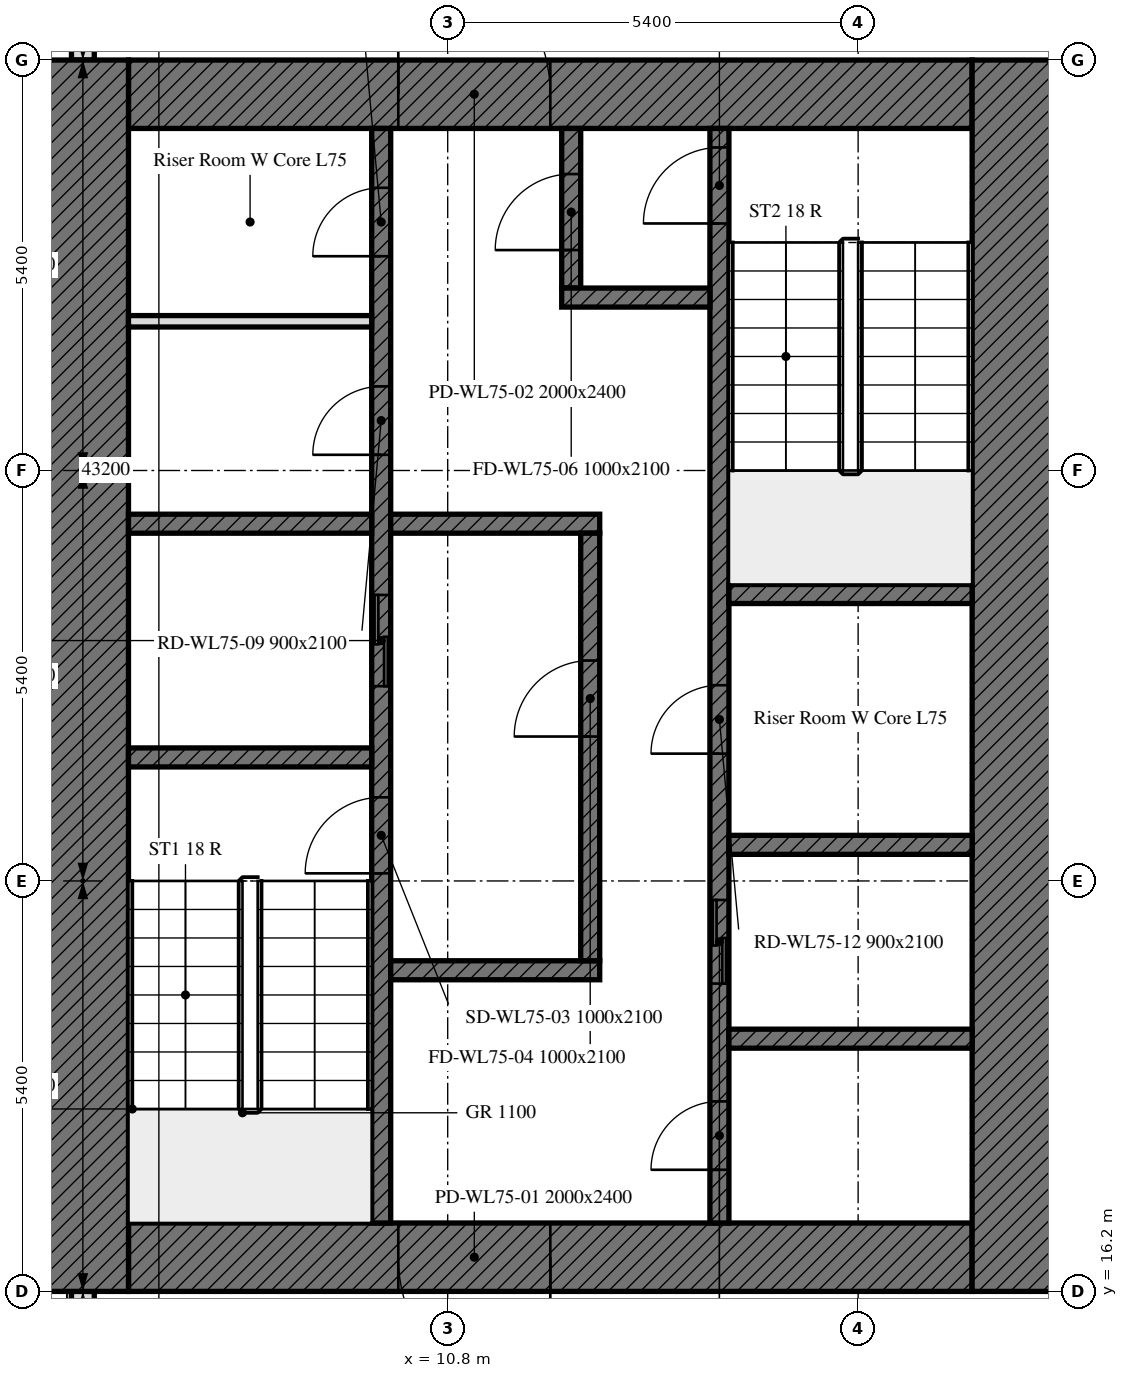
"""IFC4 building model, lengths in metres.
Left out: names, types, materials, properties, quantities, classifications, styles, units other than length and angle.
Written with IfcOpenShell. Run it as: python <this file> out.ifc"""

import sys

from ifc_helpers import new_model, si_unit, direction, frame, frame_2d, origin, place, context, subcontext, project, spatial, rectangle, extrude, element, fill, save


model = new_model("IFC4")
c1 = context("Model", 3, precision=1e-05, world=origin(), true_north=direction((0.0, 1.0)))
c2 = subcontext(c1, "Body", "Model", "MODEL_VIEW")
j1 = project(units=[si_unit("LENGTHUNIT", "METRE"), si_unit("PLANEANGLEUNIT", "RADIAN")], contexts=[c1])
p1 = place(None, origin())
s1 = spatial("IfcSite", under=j1, at=p1, CompositionType="ELEMENT")
p2 = place(p1, origin())
s2 = spatial("IfcBuilding", under=s1, at=p2, CompositionType="ELEMENT")
p3 = place(p2, frame((0.0, 0.0, 301.6)))
s3 = spatial("IfcBuildingStorey", under=s2, at=p3, CompositionType="ELEMENT", Elevation=301.6)
p4 = place(p3, frame((6.0, 43.014, 0.0), z_axis=(0.0, 0.0, 1.0), x_axis=(0.0, -1.0, 0.0)))
e1 = element("IfcWall", 1, at=p4, inside=s3, PredefinedType="SOLIDWALL", context=c2, shape_type="SweptSolid", body=[
    extrude(rectangle(XDim=10.614, YDim=0.3, at=frame_2d((5.307, 0.0))), origin(), (0.0, 0.0, 1.0), 3.0),
])
p5 = place(p4, frame((1.164, 0.0, 0.9)))
e2 = element("IfcOpeningElement", 2, at=p5, cuts=e1, PredefinedType="OPENING", context=c2, shape_type="SweptSolid", body=[
    extrude(rectangle(XDim=1.1, YDim=1.7, at=frame_2d((0.55, 0.85))), frame((0.0, 0.16, 0.0), z_axis=(0.0, -1.0, 0.0), x_axis=(1.0, 0.0, 0.0)), (0.0, 0.0, 1.0), 0.32),
])
p6 = place(p4, frame((2.764, 0.0, 0.9)))
e3 = element("IfcOpeningElement", 3, at=p6, cuts=e1, PredefinedType="OPENING", context=c2, shape_type="SweptSolid", body=[
    extrude(rectangle(XDim=1.1, YDim=1.7, at=frame_2d((0.55, 0.85))), frame((0.0, 0.16, 0.0), z_axis=(0.0, -1.0, 0.0), x_axis=(1.0, 0.0, 0.0)), (0.0, 0.0, 1.0), 0.32),
])
p7 = place(p4, frame((6.564, 0.0, 0.9)))
e4 = element("IfcOpeningElement", 4, at=p7, cuts=e1, PredefinedType="OPENING", context=c2, shape_type="SweptSolid", body=[
    extrude(rectangle(XDim=1.1, YDim=1.7, at=frame_2d((0.55, 0.85))), frame((0.0, 0.16, 0.0), z_axis=(0.0, -1.0, 0.0), x_axis=(1.0, 0.0, 0.0)), (0.0, 0.0, 1.0), 0.32),
])
p8 = place(p4, frame((7.989, 0.0, 0.9)))
e5 = element("IfcOpeningElement", 5, at=p8, cuts=e1, PredefinedType="OPENING", context=c2, shape_type="SweptSolid", body=[
    extrude(rectangle(XDim=0.65, YDim=1.7, at=frame_2d((0.325, 0.85))), frame((0.0, 0.16, 0.0), z_axis=(0.0, -1.0, 0.0), x_axis=(1.0, 0.0, 0.0)), (0.0, 0.0, 1.0), 0.32),
])
p9 = place(p3, frame((6.0, 16.2, 0.0), z_axis=(0.0, 0.0, 1.0), x_axis=(0.0, -1.0, 0.0)))
e6 = element("IfcWall", 6, at=p9, inside=s3, PredefinedType="SOLIDWALL", context=c2, shape_type="SweptSolid", body=[
    extrude(rectangle(XDim=5.214, YDim=0.3, at=frame_2d((2.607, 0.0))), origin(), (0.0, 0.0, 1.0), 3.0),
])
p10 = place(p9, frame((1.975, 0.0, 0.9)))
e7 = element("IfcOpeningElement", 7, at=p10, cuts=e6, PredefinedType="OPENING", context=c2, shape_type="SweptSolid", body=[
    extrude(rectangle(XDim=0.65, YDim=1.7, at=frame_2d((0.325, 0.85))), frame((0.0, 0.16, 0.0), z_axis=(0.0, -1.0, 0.0), x_axis=(1.0, 0.0, 0.0)), (0.0, 0.0, 1.0), 0.32),
])
p11 = place(p9, frame((2.8, 0.0, 0.9)))
e8 = element("IfcOpeningElement", 8, at=p11, cuts=e6, PredefinedType="OPENING", context=c2, shape_type="SweptSolid", body=[
    extrude(rectangle(XDim=1.1, YDim=1.7, at=frame_2d((0.55, 0.85))), frame((0.0, 0.16, 0.0), z_axis=(0.0, -1.0, 0.0), x_axis=(1.0, 0.0, 0.0)), (0.0, 0.0, 1.0), 0.32),
])
p12 = place(p3, frame((17.7, 16.65, 0.0), z_axis=(0.0, 0.0, 1.0), x_axis=(-1.0, 0.0, 0.0)))
e9 = element("IfcWall", 9, at=p12, inside=s3, PredefinedType="SOLIDWALL", context=c2, shape_type="SweptSolid", body=[
    extrude(rectangle(XDim=11.1, YDim=0.9, at=frame_2d((5.55, 0.0))), origin(), (0.0, 0.0, 1.0), 3.0),
])
p13 = place(p12, frame((5.55, 0.0, 0.0)))
e10 = element("IfcOpeningElement", 10, at=p13, cuts=e9, PredefinedType="OPENING", context=c2, shape_type="SweptSolid", body=[
    extrude(rectangle(XDim=2.0, YDim=2.4, at=frame_2d((1.0, 1.2))), frame((0.0, 0.45, 0.0), z_axis=(0.0, -1.0, 0.0), x_axis=(1.0, 0.0, 0.0)), (0.0, 0.0, 1.0), 0.9),
])
p14 = place(p3, frame((6.6, 31.95, 0.0), z_axis=(0.0, 0.0, 1.0), x_axis=(1.0, 0.0, 0.0)))
e11 = element("IfcWall", 11, at=p14, inside=s3, PredefinedType="SOLIDWALL", context=c2, shape_type="SweptSolid", body=[
    extrude(rectangle(XDim=11.1, YDim=0.9, at=frame_2d((5.55, 0.0))), origin(), (0.0, 0.0, 1.0), 3.0),
])
p15 = place(p14, frame((3.55, 0.0, 0.0)))
e12 = element("IfcOpeningElement", 12, at=p15, cuts=e11, PredefinedType="OPENING", context=c2, shape_type="SweptSolid", body=[
    extrude(rectangle(XDim=2.0, YDim=2.4, at=frame_2d((1.0, 1.2))), frame((0.0, 0.45, 0.0), z_axis=(0.0, -1.0, 0.0), x_axis=(1.0, 0.0, 0.0)), (0.0, 0.0, 1.0), 0.9),
])
for number, where, z_axis, x_axis in (
    (13, (6.0, 16.2, 0.0), (0.0, 0.0, 1.0), (0.0, 1.0, 0.0)),
    (14, (18.3, 32.4, 0.0), (0.0, 0.0, 1.0), (0.0, -1.0, 0.0)),
):
    element("IfcWall", number, at=place(p3, frame(where, z_axis=z_axis, x_axis=x_axis)), inside=s3, PredefinedType="SOLIDWALL", context=c2, shape_type="SweptSolid", body=[
        extrude(rectangle(XDim=16.2, YDim=1.2, at=frame_2d((8.1, 0.0))), origin(), (0.0, 0.0, 1.0), 3.0),
    ])
p16 = place(p3, frame((9.925, 17.1, 0.0), z_axis=(0.0, 0.0, 1.0), x_axis=(0.0, 1.0, 0.0)))
e15 = element("IfcWall", 15, at=p16, inside=s3, PredefinedType="SOLIDWALL", context=c2, shape_type="SweptSolid", body=[
    extrude(rectangle(XDim=14.4, YDim=0.25, at=frame_2d((7.2, 0.0))), origin(), (0.0, 0.0, 1.0), 3.0),
])
p17 = place(p16, frame((4.6, 0.0, 0.0)))
e16 = element("IfcOpeningElement", 16, at=p17, cuts=e15, PredefinedType="OPENING", context=c2, shape_type="SweptSolid", body=[
    extrude(rectangle(XDim=1.0, YDim=2.1, at=frame_2d((0.5, 1.05))), frame((0.0, 0.125, 0.0), z_axis=(0.0, -1.0, 0.0), x_axis=(1.0, 0.0, 0.0)), (0.0, 0.0, 1.0), 0.25),
])
p18 = place(p16, frame((7.062, 0.0, 0.0)))
e17 = element("IfcOpeningElement", 17, at=p18, cuts=e15, PredefinedType="OPENING", context=c2, shape_type="SweptSolid", body=[
    extrude(rectangle(XDim=1.2, YDim=2.1, at=frame_2d((0.6, 1.05))), frame((0.0, 0.125, 0.0), z_axis=(0.0, -1.0, 0.0), x_axis=(1.0, 0.0, 0.0)), (0.0, 0.0, 1.0), 0.25),
])
p19 = place(p16, frame((10.106, 0.0, 0.0)))
e18 = element("IfcOpeningElement", 18, at=p19, cuts=e15, PredefinedType="OPENING", context=c2, shape_type="SweptSolid", body=[
    extrude(rectangle(XDim=0.9, YDim=2.1, at=frame_2d((0.45, 1.05))), frame((0.0, 0.125, 0.0), z_axis=(0.0, -1.0, 0.0), x_axis=(1.0, 0.0, 0.0)), (0.0, 0.0, 1.0), 0.25),
])
p20 = place(p16, frame((12.719, 0.0, 0.0)))
e19 = element("IfcOpeningElement", 19, at=p20, cuts=e15, PredefinedType="OPENING", context=c2, shape_type="SweptSolid", body=[
    extrude(rectangle(XDim=0.9, YDim=2.1, at=frame_2d((0.45, 1.05))), frame((0.0, 0.125, 0.0), z_axis=(0.0, -1.0, 0.0), x_axis=(1.0, 0.0, 0.0)), (0.0, 0.0, 1.0), 0.25),
])
p21 = place(p3, frame((14.375, 17.1, 0.0), z_axis=(0.0, 0.0, 1.0), x_axis=(0.0, 1.0, 0.0)))
e20 = element("IfcWall", 20, at=p21, inside=s3, PredefinedType="SOLIDWALL", context=c2, shape_type="SweptSolid", body=[
    extrude(rectangle(XDim=14.4, YDim=0.25, at=frame_2d((7.2, 0.0))), origin(), (0.0, 0.0, 1.0), 3.0),
])
p22 = place(p21, frame((13.15, 0.0, 0.0)))
e21 = element("IfcOpeningElement", 21, at=p22, cuts=e20, PredefinedType="OPENING", context=c2, shape_type="SweptSolid", body=[
    extrude(rectangle(XDim=1.0, YDim=2.1, at=frame_2d((0.5, 1.05))), frame((0.0, 0.125, 0.0), z_axis=(0.0, -1.0, 0.0), x_axis=(1.0, 0.0, 0.0)), (0.0, 0.0, 1.0), 0.25),
])
p23 = place(p21, frame((3.15, 0.0, 0.0)))
e22 = element("IfcOpeningElement", 22, at=p23, cuts=e20, PredefinedType="OPENING", context=c2, shape_type="SweptSolid", body=[
    extrude(rectangle(XDim=1.1, YDim=2.1, at=frame_2d((0.55, 1.05))), frame((0.0, 0.125, 0.0), z_axis=(0.0, -1.0, 0.0), x_axis=(1.0, 0.0, 0.0)), (0.0, 0.0, 1.0), 0.25),
])
p24 = place(p21, frame((0.7, 0.0, 0.0)))
e23 = element("IfcOpeningElement", 23, at=p24, cuts=e20, PredefinedType="OPENING", context=c2, shape_type="SweptSolid", body=[
    extrude(rectangle(XDim=0.9, YDim=2.1, at=frame_2d((0.45, 1.05))), frame((0.0, 0.125, 0.0), z_axis=(0.0, -1.0, 0.0), x_axis=(1.0, 0.0, 0.0)), (0.0, 0.0, 1.0), 0.25),
])
p25 = place(p21, frame((6.175, 0.0, 0.0)))
e24 = element("IfcOpeningElement", 24, at=p25, cuts=e20, PredefinedType="OPENING", context=c2, shape_type="SweptSolid", body=[
    extrude(rectangle(XDim=0.9, YDim=2.1, at=frame_2d((0.45, 1.05))), frame((0.0, 0.125, 0.0), z_axis=(0.0, -1.0, 0.0), x_axis=(1.0, 0.0, 0.0)), (0.0, 0.0, 1.0), 0.25),
])
for number, where, z_axis, x_axis in (
    (25, (6.6, 23.225, 0.0), (0.0, 0.0, 1.0), (1.0, 0.0, 0.0)),
    (26, (14.5, 25.375, 0.0), (0.0, 0.0, 1.0), (1.0, 0.0, 0.0)),
    (27, (14.5, 22.075, 0.0), (0.0, 0.0, 1.0), (1.0, 0.0, 0.0)),
    (28, (6.6, 26.3, 0.0), (0.0, 0.0, 1.0), (1.0, 0.0, 0.0)),
):
    element("IfcWall", number, at=place(p3, frame(where, z_axis=z_axis, x_axis=x_axis)), inside=s3, PredefinedType="SOLIDWALL", context=c2, shape_type="SweptSolid", body=[
        extrude(rectangle(XDim=3.2, YDim=0.25, at=frame_2d((1.6, 0.0))), origin(), (0.0, 0.0, 1.0), 3.0),
    ])
for number, where, z_axis, x_axis in (
    (29, (10.05, 26.3, 0.0), (0.0, 0.0, 1.0), (1.0, 0.0, 0.0)),
    (30, (10.05, 20.425, 0.0), (0.0, 0.0, 1.0), (1.0, 0.0, 0.0)),
):
    element("IfcWall", number, at=place(p3, frame(where, z_axis=z_axis, x_axis=x_axis)), inside=s3, PredefinedType="SOLIDWALL", context=c2, shape_type="SweptSolid", body=[
        extrude(rectangle(XDim=2.75, YDim=0.25, at=frame_2d((1.375, 0.0))), origin(), (0.0, 0.0, 1.0), 3.0),
    ])
p26 = place(p3, frame((12.425, 29.4, 0.0), z_axis=(0.0, 0.0, 1.0), x_axis=(0.0, 1.0, 0.0)))
e31 = element("IfcWall", 31, at=p26, inside=s3, PredefinedType="SOLIDWALL", context=c2, shape_type="SweptSolid", body=[
    extrude(rectangle(XDim=2.1, YDim=0.25, at=frame_2d((1.05, 0.0))), origin(), (0.0, 0.0, 1.0), 3.0),
])
p27 = place(p26, frame((0.5, 0.0, 0.0)))
e32 = element("IfcOpeningElement", 32, at=p27, cuts=e31, PredefinedType="OPENING", context=c2, shape_type="SweptSolid", body=[
    extrude(rectangle(XDim=1.0, YDim=2.1, at=frame_2d((0.5, 1.05))), frame((0.0, 0.125, 0.0), z_axis=(0.0, -1.0, 0.0), x_axis=(1.0, 0.0, 0.0)), (0.0, 0.0, 1.0), 0.25),
])
p28 = place(p3, frame((12.3, 29.275, 0.0), z_axis=(0.0, 0.0, 1.0), x_axis=(1.0, 0.0, 0.0)))
e33 = element("IfcWall", 33, at=p28, inside=s3, PredefinedType="SOLIDWALL", context=c2, shape_type="SweptSolid", body=[
    extrude(rectangle(XDim=1.95, YDim=0.25, at=frame_2d((0.975, 0.0))), origin(), (0.0, 0.0, 1.0), 3.0),
])
p29 = place(p3, frame((12.675, 20.55, 0.0), z_axis=(0.0, 0.0, 1.0), x_axis=(0.0, 1.0, 0.0)))
e34 = element("IfcWall", 34, at=p29, inside=s3, PredefinedType="SOLIDWALL", context=c2, shape_type="SweptSolid", body=[
    extrude(rectangle(XDim=5.625, YDim=0.25, at=frame_2d((2.812, 0.0))), origin(), (0.0, 0.0, 1.0), 3.0),
])
p30 = place(p29, frame((2.95, 0.0, 0.0)))
e35 = element("IfcOpeningElement", 35, at=p30, cuts=e34, PredefinedType="OPENING", context=c2, shape_type="SweptSolid", body=[
    extrude(rectangle(XDim=1.0, YDim=2.1, at=frame_2d((0.5, 1.05))), frame((0.0, 0.125, 0.0), z_axis=(0.0, -1.0, 0.0), x_axis=(1.0, 0.0, 0.0)), (0.0, 0.0, 1.0), 0.25),
])
p31 = place(p3, frame((14.5, 19.525, 0.0), z_axis=(0.0, 0.0, 1.0), x_axis=(1.0, 0.0, 0.0)))
e36 = element("IfcWall", 36, at=p31, inside=s3, PredefinedType="SOLIDWALL", context=c2, shape_type="SweptSolid", body=[
    extrude(rectangle(XDim=3.2, YDim=0.25, at=frame_2d((1.6, 0.0))), origin(), (0.0, 0.0, 1.0), 3.0),
])
p32 = place(p3, frame((6.6, 28.963, 0.0), z_axis=(0.0, 0.0, 1.0), x_axis=(1.0, 0.0, 0.0)))
e37 = element("IfcWall", 37, at=p32, inside=s3, PredefinedType="PARTITIONING", context=c2, shape_type="SweptSolid", body=[
    extrude(rectangle(XDim=3.2, YDim=0.15, at=frame_2d((1.6, 0.0))), origin(), (0.0, 0.0, 1.0), 3.0),
])
p33 = place(p13, origin())
e38 = element("IfcDoor", 38, at=p33, inside=s3, OperationType="DOUBLE_DOOR_SINGLE_SWING", PredefinedType="DOOR", context=c2, shape_type="SweptSolid", body=[
    extrude(rectangle(XDim=2.0, YDim=2.4, at=frame_2d((1.0, 1.2))), frame((0.0, 0.025, 0.0), z_axis=(0.0, -1.0, 0.0), x_axis=(1.0, 0.0, 0.0)), (0.0, 0.0, 1.0), 0.05),
])
fill(e10, e38)
p34 = place(p15, origin())
e39 = element("IfcDoor", 39, at=p34, inside=s3, OperationType="DOUBLE_DOOR_SINGLE_SWING", PredefinedType="DOOR", context=c2, shape_type="SweptSolid", body=[
    extrude(rectangle(XDim=2.0, YDim=2.4, at=frame_2d((1.0, 1.2))), frame((0.0, 0.025, 0.0), z_axis=(0.0, -1.0, 0.0), x_axis=(1.0, 0.0, 0.0)), (0.0, 0.0, 1.0), 0.05),
])
fill(e12, e39)
p35 = place(p17, origin())
e40 = element("IfcDoor", 40, at=p35, inside=s3, OperationType="SINGLE_SWING_LEFT", PredefinedType="DOOR", context=c2, shape_type="SweptSolid", body=[
    extrude(rectangle(XDim=1.0, YDim=2.1, at=frame_2d((0.5, 1.05))), frame((0.0, 0.025, 0.0), z_axis=(0.0, -1.0, 0.0), x_axis=(1.0, 0.0, 0.0)), (0.0, 0.0, 1.0), 0.05),
])
fill(e16, e40)
p36 = place(p30, origin())
e41 = element("IfcDoor", 41, at=p36, inside=s3, OperationType="SINGLE_SWING_LEFT", PredefinedType="DOOR", context=c2, shape_type="SweptSolid", body=[
    extrude(rectangle(XDim=1.0, YDim=2.1, at=frame_2d((0.5, 1.05))), frame((0.0, 0.025, 0.0), z_axis=(0.0, -1.0, 0.0), x_axis=(1.0, 0.0, 0.0)), (0.0, 0.0, 1.0), 0.05),
])
fill(e35, e41)
p37 = place(p22, origin())
e42 = element("IfcDoor", 42, at=p37, inside=s3, OperationType="SINGLE_SWING_LEFT", PredefinedType="DOOR", context=c2, shape_type="SweptSolid", body=[
    extrude(rectangle(XDim=1.0, YDim=2.1, at=frame_2d((0.5, 1.05))), frame((0.0, 0.025, 0.0), z_axis=(0.0, -1.0, 0.0), x_axis=(1.0, 0.0, 0.0)), (0.0, 0.0, 1.0), 0.05),
])
fill(e21, e42)
p38 = place(p27, origin())
e43 = element("IfcDoor", 43, at=p38, inside=s3, OperationType="SINGLE_SWING_LEFT", PredefinedType="DOOR", context=c2, shape_type="SweptSolid", body=[
    extrude(rectangle(XDim=1.0, YDim=2.1, at=frame_2d((0.5, 1.05))), frame((0.0, 0.025, 0.0), z_axis=(0.0, -1.0, 0.0), x_axis=(1.0, 0.0, 0.0)), (0.0, 0.0, 1.0), 0.05),
])
fill(e32, e43)
p39 = place(p18, origin())
e44 = element("IfcDoor", 44, at=p39, inside=s3, OperationType="DOUBLE_DOOR_SLIDING", PredefinedType="DOOR", context=c2, shape_type="SweptSolid", body=[
    extrude(rectangle(XDim=1.2, YDim=2.1, at=frame_2d((0.6, 1.05))), frame((0.0, 0.025, 0.0), z_axis=(0.0, -1.0, 0.0), x_axis=(1.0, 0.0, 0.0)), (0.0, 0.0, 1.0), 0.05),
])
fill(e17, e44)
p40 = place(p23, origin())
e45 = element("IfcDoor", 45, at=p40, inside=s3, OperationType="DOUBLE_DOOR_SLIDING", PredefinedType="DOOR", context=c2, shape_type="SweptSolid", body=[
    extrude(rectangle(XDim=1.1, YDim=2.1, at=frame_2d((0.55, 1.05))), frame((0.0, 0.025, 0.0), z_axis=(0.0, -1.0, 0.0), x_axis=(1.0, 0.0, 0.0)), (0.0, 0.0, 1.0), 0.05),
])
fill(e22, e45)
p41 = place(p19, origin())
e46 = element("IfcDoor", 46, at=p41, inside=s3, OperationType="SINGLE_SWING_LEFT", PredefinedType="DOOR", context=c2, shape_type="SweptSolid", body=[
    extrude(rectangle(XDim=0.9, YDim=2.1, at=frame_2d((0.45, 1.05))), frame((0.0, 0.025, 0.0), z_axis=(0.0, -1.0, 0.0), x_axis=(1.0, 0.0, 0.0)), (0.0, 0.0, 1.0), 0.05),
])
fill(e18, e46)
p42 = place(p20, origin())
e47 = element("IfcDoor", 47, at=p42, inside=s3, OperationType="SINGLE_SWING_LEFT", PredefinedType="DOOR", context=c2, shape_type="SweptSolid", body=[
    extrude(rectangle(XDim=0.9, YDim=2.1, at=frame_2d((0.45, 1.05))), frame((0.0, 0.025, 0.0), z_axis=(0.0, -1.0, 0.0), x_axis=(1.0, 0.0, 0.0)), (0.0, 0.0, 1.0), 0.05),
])
fill(e19, e47)
p43 = place(p24, origin())
e48 = element("IfcDoor", 48, at=p43, inside=s3, OperationType="SINGLE_SWING_LEFT", PredefinedType="DOOR", context=c2, shape_type="SweptSolid", body=[
    extrude(rectangle(XDim=0.9, YDim=2.1, at=frame_2d((0.45, 1.05))), frame((0.0, 0.025, 0.0), z_axis=(0.0, -1.0, 0.0), x_axis=(1.0, 0.0, 0.0)), (0.0, 0.0, 1.0), 0.05),
])
fill(e23, e48)
p44 = place(p25, origin())
e49 = element("IfcDoor", 49, at=p44, inside=s3, OperationType="SINGLE_SWING_LEFT", PredefinedType="DOOR", context=c2, shape_type="SweptSolid", body=[
    extrude(rectangle(XDim=0.9, YDim=2.1, at=frame_2d((0.45, 1.05))), frame((0.0, 0.025, 0.0), z_axis=(0.0, -1.0, 0.0), x_axis=(1.0, 0.0, 0.0)), (0.0, 0.0, 1.0), 0.05),
])
fill(e24, e49)
save(model, sys.argv[1])
